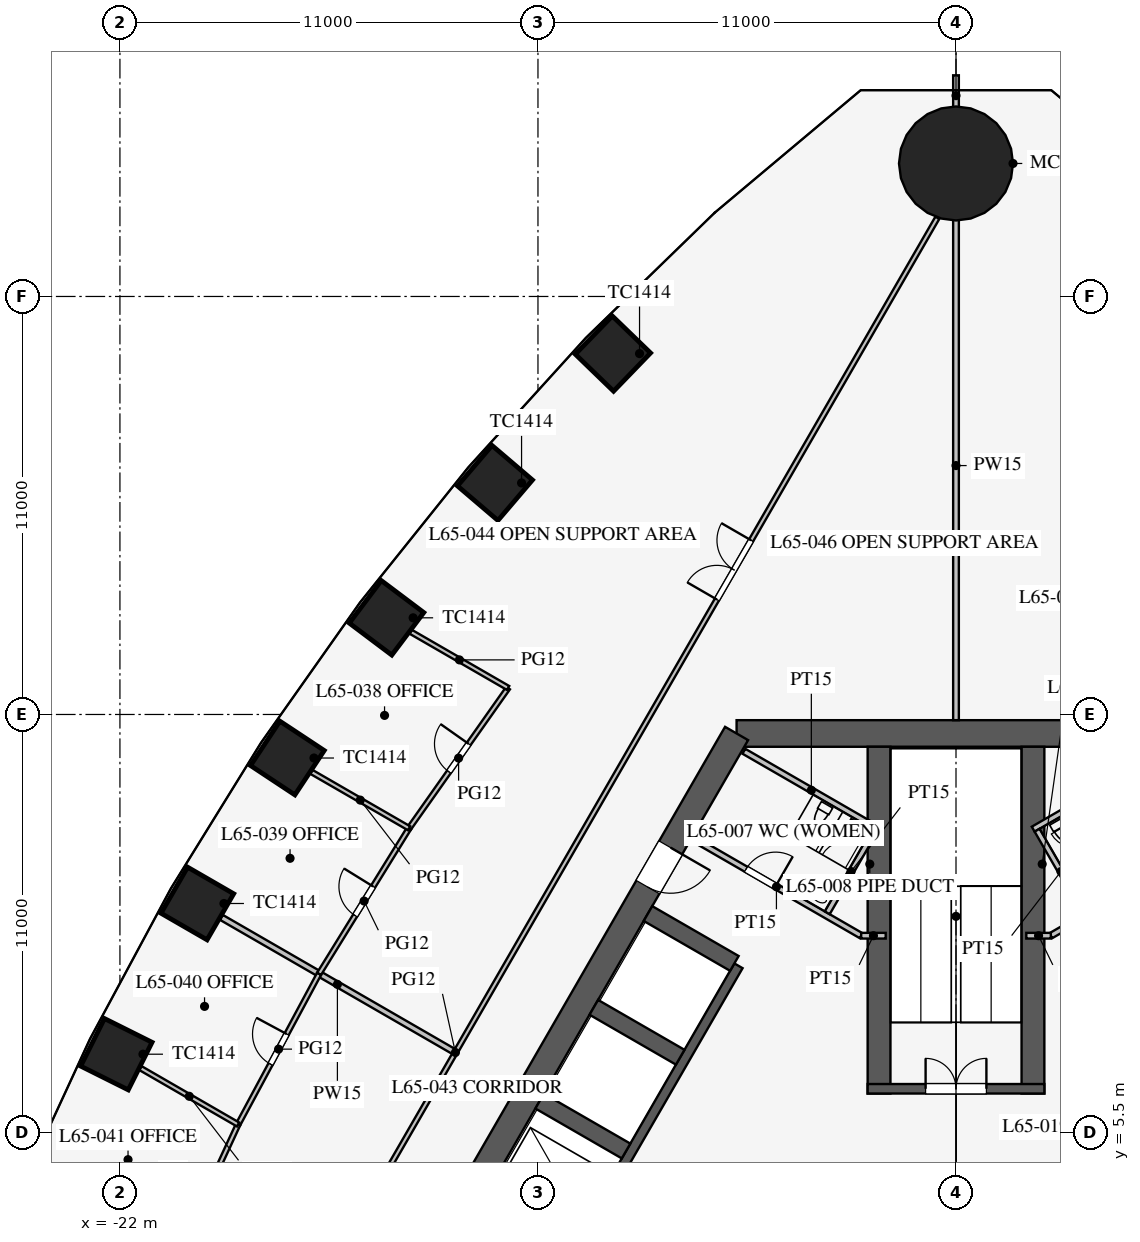
"""IFC4 building model, lengths in metres.
Left out: names, types, materials, properties, quantities, classifications, styles, units other than length and angle.
Written with IfcOpenShell. Run it as: python <this file> out.ifc"""

import sys

from ifc_helpers import new_model, si_unit, direction, frame, frame_2d, origin, origin_2d, place, context, subcontext, project, spatial, rectangle, circle, extrude, element, fill, save


model = new_model("IFC4")
c1 = context("Model", 3, precision=1e-05, world=origin(), true_north=direction((0.0, 1.0)))
c2 = subcontext(c1, "Body", "Model", "MODEL_VIEW")
j1 = project(units=[si_unit("LENGTHUNIT", "METRE"), si_unit("PLANEANGLEUNIT", "RADIAN")], contexts=[c1])
p1 = place(None, origin())
s1 = spatial("IfcSite", under=j1, at=p1, CompositionType="ELEMENT")
p2 = place(p1, origin())
s2 = spatial("IfcBuilding", under=s1, at=p2, CompositionType="ELEMENT")
p3 = place(p2, frame((0.0, 0.0, 284.7)))
s3 = spatial("IfcBuildingStorey", under=s2, at=p3, CompositionType="ELEMENT", Elevation=284.7)
for number, where, z_axis, x_axis in (
    (1, (-9.027, 25.997, 0.0), (0.0, 0.0, 1.0), (-0.695, -0.719, 0.0)),
    (2, (-12.132, 22.593, 0.0), (0.0, 0.0, 1.0), (-0.649, -0.761, 0.0)),
    (3, (-14.985, 19.044, 0.0), (0.0, 0.0, 1.0), (-0.601, -0.799, 0.0)),
    (4, (-17.594, 15.354, 0.0), (0.0, 0.0, 1.0), (-0.552, -0.834, 0.0)),
    (5, (-19.963, 11.526, 0.0), (0.0, 0.0, 1.0), (-0.5, -0.866, 0.0)),
    (6, (-22.094, 7.56, 0.0), (0.0, 0.0, 1.0), (-0.447, -0.895, 0.0)),
):
    element("IfcColumn", number, at=place(p3, frame(where, z_axis=z_axis, x_axis=x_axis)), inside=s3, PredefinedType="COLUMN", context=c2, shape_type="SweptSolid", body=[
        extrude(rectangle(XDim=1.4, YDim=1.4, at=origin_2d()), origin(), (0.0, 0.0, 1.0), 4.2),
    ])
p4 = place(p3, frame((0.0, 31.0, 0.0), z_axis=(0.0, 0.0, 1.0), x_axis=(1.0, 0.0, 0.0)))
e7 = element("IfcColumn", 7, at=p4, inside=s3, PredefinedType="COLUMN", context=c2, shape_type="SweptSolid", body=[
    extrude(circle(Radius=1.5, at=origin_2d()), origin(), (0.0, 0.0, 1.0), 4.2),
])
p5 = place(p3, frame((5.773, 16.0, 0.0), z_axis=(0.0, 0.0, 1.0), x_axis=(-1.0, 0.0, 0.0)))
e8 = element("IfcWall", 8, at=p5, inside=s3, PredefinedType="SHEAR", context=c2, shape_type="SweptSolid", body=[
    extrude(rectangle(XDim=11.547, YDim=0.7, at=frame_2d((5.773, 0.0))), origin(), (0.0, 0.0, 1.0), 4.2),
])
p6 = place(p3, frame((-5.773, 16.0, 0.0), z_axis=(0.0, 0.0, 1.0), x_axis=(-0.500002442456, -0.866023993627, 0.0)))
e9 = element("IfcWall", 9, at=p6, inside=s3, PredefinedType="SHEAR", context=c2, shape_type="SweptSolid", body=[
    extrude(rectangle(XDim=21.939, YDim=0.7, at=frame_2d((10.97, 0.0))), origin(), (0.0, 0.0, 1.0), 4.2),
])
p7 = place(p6, frame((17.27, 0.0, 0.0)))
e10 = element("IfcOpeningElement", 10, at=p7, cuts=e9, PredefinedType="OPENING", context=c2, shape_type="SweptSolid", body=[
    extrude(rectangle(XDim=1.2, YDim=2.1, at=frame_2d((0.6, 1.05))), frame((0.0, 0.36, 0.0), z_axis=(0.0, -1.0, 0.0), x_axis=(1.0, 0.0, 0.0)), (0.0, 0.0, 1.0), 0.72),
])
p8 = place(p6, frame((3.47, 0.0, 0.0)))
e11 = element("IfcOpeningElement", 11, at=p8, cuts=e9, PredefinedType="OPENING", context=c2, shape_type="SweptSolid", body=[
    extrude(rectangle(XDim=1.2, YDim=2.1, at=frame_2d((0.6, 1.05))), frame((0.0, 0.36, 0.0), z_axis=(0.0, -1.0, 0.0), x_axis=(1.0, 0.0, 0.0)), (0.0, 0.0, 1.0), 0.72),
])
p9 = place(p3, frame((-5.724, 9.886, 0.0), z_axis=(0.0, 0.0, 1.0), x_axis=(-0.500001763848, -0.866024385424, 0.0)))
e12 = element("IfcWall", 12, at=p9, inside=s3, PredefinedType="SHEAR", context=c2, shape_type="SweptSolid", body=[
    extrude(rectangle(XDim=11.4, YDim=0.25, at=frame_2d((5.7, 0.0))), origin(), (0.0, 0.0, 1.0), 4.2),
])
p10 = place(p9, frame((6.525, 0.0, 0.0)))
e13 = element("IfcOpeningElement", 13, at=p10, cuts=e12, PredefinedType="OPENING", context=c2, shape_type="SweptSolid", body=[
    extrude(rectangle(XDim=1.2, YDim=2.2, at=frame_2d((0.6, 1.1))), frame((0.0, 0.135, 0.0), z_axis=(0.0, -1.0, 0.0), x_axis=(1.0, 0.0, 0.0)), (0.0, 0.0, 1.0), 0.27),
])
p11 = place(p9, frame((9.375, 0.0, 0.0)))
e14 = element("IfcOpeningElement", 14, at=p11, cuts=e12, PredefinedType="OPENING", context=c2, shape_type="SweptSolid", body=[
    extrude(rectangle(XDim=1.2, YDim=2.2, at=frame_2d((0.6, 1.1))), frame((0.0, 0.135, 0.0), z_axis=(0.0, -1.0, 0.0), x_axis=(1.0, 0.0, 0.0)), (0.0, 0.0, 1.0), 0.27),
])
for number, where, z_axis, x_axis in (
    (15, (-5.832, 9.949, 0.0), (0.0, 0.0, 1.0), (-0.866, 0.5, 0.0)),
    (16, (-7.257, 7.481, 0.0), (0.0, 0.0, 1.0), (-0.866, 0.5, 0.0)),
    (17, (-8.682, 5.012, 0.0), (0.0, 0.0, 1.0), (-0.866, 0.5, 0.0)),
):
    element("IfcWall", number, at=place(p3, frame(where, z_axis=z_axis, x_axis=x_axis)), inside=s3, PredefinedType="SHEAR", context=c2, shape_type="SweptSolid", body=[
        extrude(rectangle(XDim=2.625, YDim=0.45, at=frame_2d((1.312, 0.0))), origin(), (0.0, 0.0, 1.0), 4.2),
    ])
for number, where, z_axis, x_axis in (
    (18, (2.025, 6.525, 0.0), (0.0, 0.0, 1.0), (0.0, 1.0, 0.0)),
    (19, (-2.025, 6.525, 0.0), (0.0, 0.0, 1.0), (0.0, 1.0, 0.0)),
):
    element("IfcWall", number, at=place(p3, frame(where, z_axis=z_axis, x_axis=x_axis)), inside=s3, PredefinedType="SHEAR", context=c2, shape_type="SweptSolid", body=[
        extrude(rectangle(XDim=9.125, YDim=0.6, at=frame_2d((4.562, 0.0))), origin(), (0.0, 0.0, 1.0), 4.2),
    ])
p12 = place(p3, frame((2.325, 6.65, 0.0), z_axis=(0.0, 0.0, 1.0), x_axis=(-1.0, 0.0, 0.0)))
e20 = element("IfcWall", 20, at=p12, inside=s3, PredefinedType="SHEAR", context=c2, shape_type="SweptSolid", body=[
    extrude(rectangle(XDim=4.65, YDim=0.25, at=frame_2d((2.325, 0.0))), origin(), (0.0, 0.0, 1.0), 4.2),
])
p13 = place(p12, frame((1.525, 0.0, 0.0)))
e21 = element("IfcOpeningElement", 21, at=p13, cuts=e20, PredefinedType="OPENING", context=c2, shape_type="SweptSolid", body=[
    extrude(rectangle(XDim=1.6, YDim=2.1, at=frame_2d((0.8, 1.05))), frame((0.0, 0.135, 0.0), z_axis=(0.0, -1.0, 0.0), x_axis=(1.0, 0.0, 0.0)), (0.0, 0.0, 1.0), 0.27),
])
p14 = place(p3, frame((2.495, 10.678, 0.0), z_axis=(0.0, 0.0, 1.0), x_axis=(0.866037967349, 0.499978238636, 0.0)))
e22 = element("IfcWall", 22, at=p14, inside=s3, PredefinedType="PARTITIONING", context=c2, shape_type="SweptSolid", body=[
    extrude(rectangle(XDim=5.15, YDim=0.15, at=frame_2d((2.575, 0.0))), origin(), (0.0, 0.0, 1.0), 4.0),
])
p15 = place(p14, frame((1.3, 0.0, 0.0)))
e23 = element("IfcOpeningElement", 23, at=p15, cuts=e22, PredefinedType="OPENING", context=c2, shape_type="SweptSolid", body=[
    extrude(rectangle(XDim=0.9, YDim=2.1, at=frame_2d((0.45, 1.05))), frame((0.0, 0.085, 0.0), z_axis=(0.0, -1.0, 0.0), x_axis=(1.0, 0.0, 0.0)), (0.0, 0.0, 1.0), 0.17),
])
p16 = place(p3, frame((-2.495, 10.678, 0.0), z_axis=(0.0, 0.0, 1.0), x_axis=(-0.866037967349, 0.499978238636, 0.0)))
e24 = element("IfcWall", 24, at=p16, inside=s3, PredefinedType="PARTITIONING", context=c2, shape_type="SweptSolid", body=[
    extrude(rectangle(XDim=5.15, YDim=0.15, at=frame_2d((2.575, 0.0))), origin(), (0.0, 0.0, 1.0), 4.0),
])
p17 = place(p16, frame((2.6, 0.0, 0.0)))
e25 = element("IfcOpeningElement", 25, at=p17, cuts=e24, PredefinedType="OPENING", context=c2, shape_type="SweptSolid", body=[
    extrude(rectangle(XDim=0.9, YDim=2.1, at=frame_2d((0.45, 1.05))), frame((0.0, 0.085, 0.0), z_axis=(0.0, -1.0, 0.0), x_axis=(1.0, 0.0, 0.0)), (0.0, 0.0, 1.0), 0.17),
])
for number, where, z_axis, x_axis in (
    (26, (2.495, 10.678, 0.0), (0.0, 0.0, 1.0), (-1.0, 0.0, 0.0)),
    (27, (-2.495, 10.678, 0.0), (0.0, 0.0, 1.0), (1.0, 0.0, 0.0)),
):
    element("IfcWall", number, at=place(p3, frame(where, z_axis=z_axis, x_axis=x_axis)), inside=s3, PredefinedType="PARTITIONING", context=c2, shape_type="SweptSolid", body=[
        extrude(rectangle(XDim=0.645, YDim=0.15, at=frame_2d((0.323, 0.0))), origin(), (0.0, 0.0, 1.0), 4.0),
    ])
p18 = place(p3, frame((2.031, 13.482, 0.0), z_axis=(0.0, 0.0, 1.0), x_axis=(0.866050731258, 0.499956128963, 0.0)))
e28 = element("IfcWall", 28, at=p18, inside=s3, PredefinedType="PARTITIONING", context=c2, shape_type="SweptSolid", body=[
    extrude(rectangle(XDim=4.1, YDim=0.15, at=frame_2d((2.05, 0.0))), origin(), (0.0, 0.0, 1.0), 4.0),
])
p19 = place(p3, frame((3.389, 11.281, 0.0), z_axis=(0.0, 0.0, 1.0), x_axis=(-0.499989096993, 0.866031698547, 0.0)))
e29 = element("IfcWall", 29, at=p19, inside=s3, PredefinedType="PARTITIONING", context=c2, shape_type="SweptSolid", body=[
    extrude(rectangle(XDim=2.51, YDim=0.15, at=frame_2d((1.255, 0.0))), origin(), (0.0, 0.0, 1.0), 4.0),
])
p20 = place(p3, frame((-2.031, 13.482, 0.0), z_axis=(0.0, 0.0, 1.0), x_axis=(-0.866050731258, 0.499956128963, 0.0)))
e30 = element("IfcWall", 30, at=p20, inside=s3, PredefinedType="PARTITIONING", context=c2, shape_type="SweptSolid", body=[
    extrude(rectangle(XDim=4.1, YDim=0.15, at=frame_2d((2.05, 0.0))), origin(), (0.0, 0.0, 1.0), 4.0),
])
p21 = place(p3, frame((-3.389, 11.281, 0.0), z_axis=(0.0, 0.0, 1.0), x_axis=(0.499989096993, 0.866031698547, 0.0)))
e31 = element("IfcWall", 31, at=p21, inside=s3, PredefinedType="PARTITIONING", context=c2, shape_type="SweptSolid", body=[
    extrude(rectangle(XDim=2.51, YDim=0.15, at=frame_2d((1.255, 0.0))), origin(), (0.0, 0.0, 1.0), 4.0),
])
p22 = place(p3, frame((0.0, 16.35, 0.0), z_axis=(0.0, 0.0, 1.0), x_axis=(0.0, 1.0, 0.0)))
e32 = element("IfcWall", 32, at=p22, inside=s3, PredefinedType="PARTITIONING", context=c2, shape_type="SweptSolid", body=[
    extrude(rectangle(XDim=13.4, YDim=0.15, at=frame_2d((6.7, 0.0))), origin(), (0.0, 0.0, 1.0), 2.5),
])
p23 = place(p3, frame((0.0, 32.25, 0.0), z_axis=(0.0, 0.0, 1.0), x_axis=(0.0, 1.0, 0.0)))
e33 = element("IfcWall", 33, at=p23, inside=s3, PredefinedType="PARTITIONING", context=c2, shape_type="SweptSolid", body=[
    extrude(rectangle(XDim=1.07, YDim=0.15, at=frame_2d((0.535, 0.0))), origin(), (0.0, 0.0, 1.0), 2.5),
])
p24 = place(p3, frame((-13.224, 7.635, 0.0), z_axis=(0.0, 0.0, 1.0), x_axis=(-0.86602299963, 0.500004164094, 0.0)))
e34 = element("IfcWall", 34, at=p24, inside=s3, PredefinedType="PARTITIONING", context=c2, shape_type="SweptSolid", body=[
    extrude(rectangle(XDim=7.052, YDim=0.15, at=frame_2d((3.526, 0.0))), origin(), (0.0, 0.0, 1.0), 3.0),
])
p25 = place(p3, frame((-0.49, 29.571, 0.0), z_axis=(0.0, 0.0, 1.0), x_axis=(-0.499999496503, -0.866025694478, 0.0)))
e35 = element("IfcWall", 35, at=p25, inside=s3, PredefinedType="PARTITIONING", context=c2, shape_type="SweptSolid", body=[
    extrude(rectangle(XDim=50.728, YDim=0.12, at=frame_2d((25.364, 0.0))), origin(), (0.0, 0.0, 1.0), 2.9),
])
p26 = place(p25, frame((9.8, 0.0, 0.15)))
e36 = element("IfcOpeningElement", 36, at=p26, cuts=e35, PredefinedType="OPENING", context=c2, shape_type="SweptSolid", body=[
    extrude(rectangle(XDim=1.8, YDim=2.1, at=frame_2d((0.9, 1.05))), frame((0.0, 0.07, 0.0), z_axis=(0.0, -1.0, 0.0), x_axis=(1.0, 0.0, 0.0)), (0.0, 0.0, 1.0), 0.14),
])
p27 = place(p25, frame((39.15, 0.0, 0.15)))
e37 = element("IfcOpeningElement", 37, at=p27, cuts=e35, PredefinedType="OPENING", context=c2, shape_type="SweptSolid", body=[
    extrude(rectangle(XDim=1.8, YDim=2.1, at=frame_2d((0.9, 1.05))), frame((0.0, 0.07, 0.0), z_axis=(0.0, -1.0, 0.0), x_axis=(1.0, 0.0, 0.0)), (0.0, 0.0, 1.0), 0.14),
])
p28 = place(p3, frame((-16.759, 9.676, 0.0), z_axis=(0.0, 0.0, 1.0), x_axis=(-0.473524102582, -0.880780860529, 0.0)))
e38 = element("IfcWall", 38, at=p28, inside=s3, PredefinedType="PARTITIONING", context=c2, shape_type="SweptSolid", body=[
    extrude(rectangle(XDim=4.502, YDim=0.12, at=frame_2d((2.251, 0.0))), origin(), (0.0, 0.0, 1.0), 2.9),
])
p29 = place(p28, frame((1.8, 0.0, 0.15)))
e39 = element("IfcOpeningElement", 39, at=p29, cuts=e38, PredefinedType="OPENING", context=c2, shape_type="SweptSolid", body=[
    extrude(rectangle(XDim=0.9, YDim=2.1, at=frame_2d((0.45, 1.05))), frame((0.0, 0.07, 0.0), z_axis=(0.0, -1.0, 0.0), x_axis=(1.0, 0.0, 0.0)), (0.0, 0.0, 1.0), 0.14),
])
p30 = place(p3, frame((-18.891, 5.71, 0.0), z_axis=(0.0, 0.0, 1.0), x_axis=(-0.419335693458, -0.907831248742, 0.0)))
e40 = element("IfcWall", 40, at=p30, inside=s3, PredefinedType="PARTITIONING", context=c2, shape_type="SweptSolid", body=[
    extrude(rectangle(XDim=4.519, YDim=0.12, at=frame_2d((2.259, 0.0))), origin(), (0.0, 0.0, 1.0), 2.9),
])
p31 = place(p30, frame((1.8, 0.0, 0.15)))
e41 = element("IfcOpeningElement", 41, at=p31, cuts=e40, PredefinedType="OPENING", context=c2, shape_type="SweptSolid", body=[
    extrude(rectangle(XDim=0.9, YDim=2.1, at=frame_2d((0.45, 1.05))), frame((0.0, 0.07, 0.0), z_axis=(0.0, -1.0, 0.0), x_axis=(1.0, 0.0, 0.0)), (0.0, 0.0, 1.0), 0.14),
])
p32 = place(p3, frame((-14.391, 13.505, 0.0), z_axis=(0.0, 0.0, 1.0), x_axis=(-0.525996140194, -0.850486954927, 0.0)))
e42 = element("IfcWall", 42, at=p32, inside=s3, PredefinedType="PARTITIONING", context=c2, shape_type="SweptSolid", body=[
    extrude(rectangle(XDim=4.502, YDim=0.12, at=frame_2d((2.251, 0.0))), origin(), (0.0, 0.0, 1.0), 2.9),
])
p33 = place(p32, frame((1.8, 0.0, 0.15)))
e43 = element("IfcOpeningElement", 43, at=p33, cuts=e42, PredefinedType="OPENING", context=c2, shape_type="SweptSolid", body=[
    extrude(rectangle(XDim=0.9, YDim=2.1, at=frame_2d((0.45, 1.05))), frame((0.0, 0.07, 0.0), z_axis=(0.0, -1.0, 0.0), x_axis=(1.0, 0.0, 0.0)), (0.0, 0.0, 1.0), 0.14),
])
p34 = place(p3, frame((-11.786, 17.197, 0.0), z_axis=(0.0, 0.0, 1.0), x_axis=(-0.576562277172, -0.817053205454, 0.0)))
e44 = element("IfcWall", 44, at=p34, inside=s3, PredefinedType="PARTITIONING", context=c2, shape_type="SweptSolid", body=[
    extrude(rectangle(XDim=4.519, YDim=0.12, at=frame_2d((2.259, 0.0))), origin(), (0.0, 0.0, 1.0), 2.9),
])
p35 = place(p34, frame((1.8, 0.0, 0.15)))
e45 = element("IfcOpeningElement", 45, at=p35, cuts=e44, PredefinedType="OPENING", context=c2, shape_type="SweptSolid", body=[
    extrude(rectangle(XDim=0.9, YDim=2.1, at=frame_2d((0.45, 1.05))), frame((0.0, 0.07, 0.0), z_axis=(0.0, -1.0, 0.0), x_axis=(1.0, 0.0, 0.0)), (0.0, 0.0, 1.0), 0.14),
])
for number, where, z_axis, x_axis in (
    (46, (-18.891, 5.71, 0.0), (0.0, 0.0, 1.0), (-0.866, 0.5, 0.0)),
    (47, (-14.391, 13.505, 0.0), (0.0, 0.0, 1.0), (-0.866, 0.5, 0.0)),
):
    element("IfcWall", number, at=place(p3, frame(where, z_axis=z_axis, x_axis=x_axis)), inside=s3, PredefinedType="PARTITIONING", context=c2, shape_type="SweptSolid", body=[
        extrude(rectangle(XDim=2.967, YDim=0.12, at=frame_2d((1.484, 0.0))), origin(), (0.0, 0.0, 1.0), 2.9),
    ])
p36 = place(p3, frame((-11.786, 17.197, 0.0), z_axis=(0.0, 0.0, 1.0), x_axis=(-0.866056430242, 0.499946256749, 0.0)))
e48 = element("IfcWall", 48, at=p36, inside=s3, PredefinedType="PARTITIONING", context=c2, shape_type="SweptSolid", body=[
    extrude(rectangle(XDim=2.959, YDim=0.12, at=frame_2d((1.479, 0.0))), origin(), (0.0, 0.0, 1.0), 2.9),
])
p37 = place(p17, frame((0.9, 0.0, 0.0), z_axis=(0.0, 0.0, 1.0), x_axis=(-1.0, 0.0, 0.0)))
e49 = element("IfcDoor", 49, at=p37, inside=s3, OperationType="SINGLE_SWING_RIGHT", PredefinedType="DOOR", context=c2, shape_type="SweptSolid", body=[
    extrude(rectangle(XDim=0.9, YDim=2.1, at=frame_2d((0.45, 1.05))), frame((0.0, 0.025, 0.0), z_axis=(0.0, -1.0, 0.0), x_axis=(1.0, 0.0, 0.0)), (0.0, 0.0, 1.0), 0.05),
])
fill(e25, e49)
p38 = place(p13, frame((1.6, 0.0, 0.0), z_axis=(0.0, 0.0, 1.0), x_axis=(-1.0, 0.0, 0.0)))
e50 = element("IfcDoor", 50, at=p38, inside=s3, OperationType="DOUBLE_DOOR_SINGLE_SWING", PredefinedType="DOOR", context=c2, shape_type="SweptSolid", body=[
    extrude(rectangle(XDim=1.6, YDim=2.1, at=frame_2d((0.8, 1.05))), frame((0.0, 0.025, 0.0), z_axis=(0.0, -1.0, 0.0), x_axis=(1.0, 0.0, 0.0)), (0.0, 0.0, 1.0), 0.05),
])
fill(e21, e50)
p39 = place(p8, origin())
e51 = element("IfcDoor", 51, at=p39, inside=s3, OperationType="SINGLE_SWING_LEFT", PredefinedType="DOOR", context=c2, shape_type="SweptSolid", body=[
    extrude(rectangle(XDim=1.2, YDim=2.1, at=frame_2d((0.6, 1.05))), frame((0.0, 0.025, 0.0), z_axis=(0.0, -1.0, 0.0), x_axis=(1.0, 0.0, 0.0)), (0.0, 0.0, 1.0), 0.05),
])
fill(e11, e51)
p40 = place(p35, frame((0.9, 0.0, 0.0), z_axis=(0.0, 0.0, 1.0), x_axis=(-1.0, 0.0, 0.0)))
e52 = element("IfcDoor", 52, at=p40, inside=s3, OperationType="SINGLE_SWING_RIGHT", PredefinedType="DOOR", context=c2, shape_type="SweptSolid", body=[
    extrude(rectangle(XDim=0.9, YDim=2.1, at=frame_2d((0.45, 1.05))), frame((0.0, 0.025, 0.0), z_axis=(0.0, -1.0, 0.0), x_axis=(1.0, 0.0, 0.0)), (0.0, 0.0, 1.0), 0.05),
])
fill(e45, e52)
p41 = place(p33, frame((0.9, 0.0, 0.0), z_axis=(0.0, 0.0, 1.0), x_axis=(-1.0, 0.0, 0.0)))
e53 = element("IfcDoor", 53, at=p41, inside=s3, OperationType="SINGLE_SWING_RIGHT", PredefinedType="DOOR", context=c2, shape_type="SweptSolid", body=[
    extrude(rectangle(XDim=0.9, YDim=2.1, at=frame_2d((0.45, 1.05))), frame((0.0, 0.025, 0.0), z_axis=(0.0, -1.0, 0.0), x_axis=(1.0, 0.0, 0.0)), (0.0, 0.0, 1.0), 0.05),
])
fill(e43, e53)
p42 = place(p29, frame((0.9, 0.0, 0.0), z_axis=(0.0, 0.0, 1.0), x_axis=(-1.0, 0.0, 0.0)))
e54 = element("IfcDoor", 54, at=p42, inside=s3, OperationType="SINGLE_SWING_RIGHT", PredefinedType="DOOR", context=c2, shape_type="SweptSolid", body=[
    extrude(rectangle(XDim=0.9, YDim=2.1, at=frame_2d((0.45, 1.05))), frame((0.0, 0.025, 0.0), z_axis=(0.0, -1.0, 0.0), x_axis=(1.0, 0.0, 0.0)), (0.0, 0.0, 1.0), 0.05),
])
fill(e39, e54)
p43 = place(p26, frame((1.8, 0.0, 0.0), z_axis=(0.0, 0.0, 1.0), x_axis=(-1.0, 0.0, 0.0)))
e55 = element("IfcDoor", 55, at=p43, inside=s3, OperationType="DOUBLE_DOOR_SINGLE_SWING", PredefinedType="DOOR", context=c2, shape_type="SweptSolid", body=[
    extrude(rectangle(XDim=1.8, YDim=2.1, at=frame_2d((0.9, 1.05))), frame((0.0, 0.025, 0.0), z_axis=(0.0, -1.0, 0.0), x_axis=(1.0, 0.0, 0.0)), (0.0, 0.0, 1.0), 0.05),
])
fill(e36, e55)
save(model, sys.argv[1])
